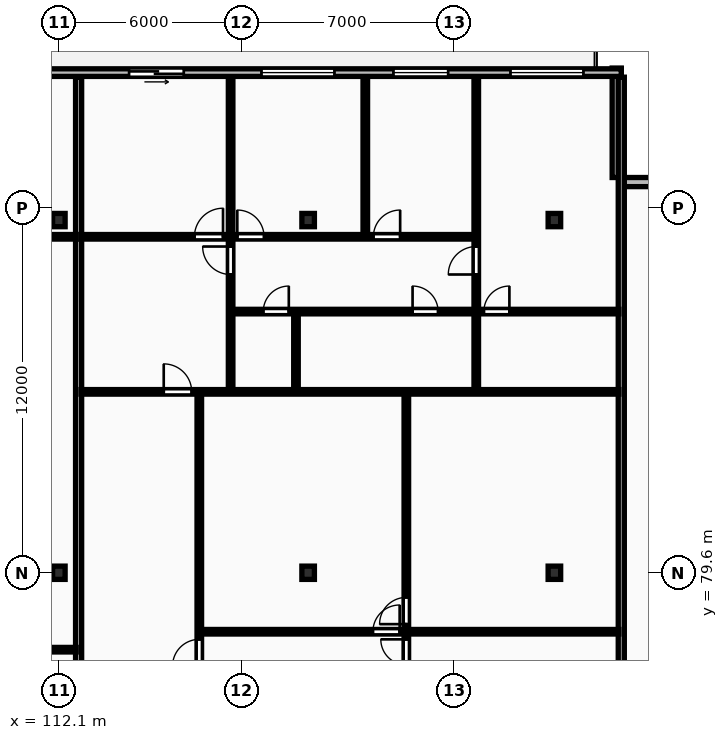
"""IFC4 building model, lengths in metres.
Left out: names, types, materials, properties, quantities, classifications, styles, units other than length and angle.
Written with IfcOpenShell. Run it as: python <this file> out.ifc"""

import sys

from ifc_helpers import new_model, si_unit, direction, frame, frame_2d, origin, origin_2d, place, context, subcontext, project, spatial, rectangle, i_section, extrude, element, fill, save


model = new_model("IFC4")
c1 = context("Model", 3, precision=1e-05, world=origin(), true_north=direction((0.0, 1.0)))
c2 = subcontext(c1, "Body", "Model", "MODEL_VIEW")
j1 = project(units=[si_unit("LENGTHUNIT", "METRE"), si_unit("PLANEANGLEUNIT", "RADIAN")], contexts=[c1])
p1 = place(None, origin())
s1 = spatial("IfcSite", under=j1, at=p1, CompositionType="ELEMENT")
p2 = place(p1, origin())
s2 = spatial("IfcBuilding", under=s1, at=p2, CompositionType="ELEMENT")
p3 = place(p2, frame((0.0, 0.0, 153.7)))
s3 = spatial("IfcBuildingStorey", under=s2, at=p3, CompositionType="ELEMENT", Elevation=153.7)
for number, where, z_axis, x_axis in (
    (1, (112.1, 79.6, 0.0), (0.0, 0.0, 1.0), (1.0, 0.0, 0.0)),
    (2, (112.1, 91.2, 0.0), (0.0, 0.0, 1.0), (1.0, 0.0, 0.0)),
    (3, (120.3, 79.6, 0.0), (0.0, 0.0, 1.0), (1.0, 0.0, 0.0)),
    (4, (120.3, 91.2, 0.0), (0.0, 0.0, 1.0), (1.0, 0.0, 0.0)),
    (5, (128.4, 79.6, 0.0), (0.0, 0.0, 1.0), (1.0, 0.0, 0.0)),
    (6, (128.4, 91.2, 0.0), (0.0, 0.0, 1.0), (1.0, 0.0, 0.0)),
):
    element("IfcColumn", number, at=place(p3, frame(where, z_axis=z_axis, x_axis=x_axis)), inside=s3, PredefinedType="COLUMN", context=c2, shape_type="SweptSolid", body=[
        extrude(i_section(OverallWidth=0.412, OverallDepth=0.437, WebThickness=0.036, FlangeThickness=0.052, FilletRadius=0.015, at=origin_2d()), origin(), (0.0, 0.0, 1.0), 3.6),
    ])
for number, where, z_axis, x_axis in (
    (7, (134.2, 92.45, 0.0), (0.0, 0.0, 1.0), (-1.0, 0.0, 0.0)),
    (8, (130.45, 92.6, 0.0), (0.0, 0.0, 1.0), (0.0, 1.0, 0.0)),
):
    element("IfcWall", number, at=place(p3, frame(where, z_axis=z_axis, x_axis=x_axis)), inside=s3, PredefinedType="STANDARD", context=c2, shape_type="SweptSolid", body=[
        extrude(rectangle(XDim=3.6, YDim=0.3, at=frame_2d((1.8, 0.0))), origin(), (0.0, 0.0, 1.0), 3.32),
    ])
p4 = place(p3, frame((130.6, 96.05, 0.0), z_axis=(0.0, 0.0, 1.0), x_axis=(-1.0, 0.0, 0.0)))
e9 = element("IfcWall", 9, at=p4, inside=s3, PredefinedType="STANDARD", context=c2, shape_type="SweptSolid", body=[
    extrude(rectangle(XDim=73.0, YDim=0.25, at=frame_2d((36.5, 0.0))), origin(), (0.0, 0.0, 1.0), 3.32),
])
p5 = place(p4, frame((68.197, 0.0, 0.0)))
e10 = element("IfcOpeningElement", 10, at=p5, cuts=e9, PredefinedType="OPENING", context=c2, shape_type="SweptSolid", body=[
    extrude(rectangle(XDim=1.8, YDim=2.2, at=frame_2d((0.9, 1.1))), frame((0.0, 0.135, 0.0), z_axis=(0.0, -1.0, 0.0), x_axis=(1.0, 0.0, 0.0)), (0.0, 0.0, 1.0), 0.27),
])
p6 = place(p4, frame((58.911, 0.0, 0.85)))
e11 = element("IfcOpeningElement", 11, at=p6, cuts=e9, PredefinedType="OPENING", context=c2, shape_type="SweptSolid", body=[
    extrude(rectangle(XDim=2.4, YDim=1.9, at=frame_2d((1.2, 0.95))), frame((0.0, 0.135, 0.0), z_axis=(0.0, -1.0, 0.0), x_axis=(1.0, 0.0, 0.0)), (0.0, 0.0, 1.0), 0.27),
])
p7 = place(p4, frame((49.571, 0.0, 0.0)))
e12 = element("IfcOpeningElement", 12, at=p7, cuts=e9, PredefinedType="OPENING", context=c2, shape_type="SweptSolid", body=[
    extrude(rectangle(XDim=1.8, YDim=2.2, at=frame_2d((0.9, 1.1))), frame((0.0, 0.135, 0.0), z_axis=(0.0, -1.0, 0.0), x_axis=(1.0, 0.0, 0.0)), (0.0, 0.0, 1.0), 0.27),
])
p8 = place(p4, frame((39.572, 0.0, 0.85)))
e13 = element("IfcOpeningElement", 13, at=p8, cuts=e9, PredefinedType="OPENING", context=c2, shape_type="SweptSolid", body=[
    extrude(rectangle(XDim=2.4, YDim=1.9, at=frame_2d((1.2, 0.95))), frame((0.0, 0.135, 0.0), z_axis=(0.0, -1.0, 0.0), x_axis=(1.0, 0.0, 0.0)), (0.0, 0.0, 1.0), 0.27),
])
p9 = place(p4, frame((30.575, 0.0, 0.0)))
e14 = element("IfcOpeningElement", 14, at=p9, cuts=e9, PredefinedType="OPENING", context=c2, shape_type="SweptSolid", body=[
    extrude(rectangle(XDim=1.8, YDim=2.2, at=frame_2d((0.9, 1.1))), frame((0.0, 0.135, 0.0), z_axis=(0.0, -1.0, 0.0), x_axis=(1.0, 0.0, 0.0)), (0.0, 0.0, 1.0), 0.27),
])
p10 = place(p4, frame((21.745, 0.0, 0.85)))
e15 = element("IfcOpeningElement", 15, at=p10, cuts=e9, PredefinedType="OPENING", context=c2, shape_type="SweptSolid", body=[
    extrude(rectangle(XDim=2.4, YDim=1.9, at=frame_2d((1.2, 0.95))), frame((0.0, 0.135, 0.0), z_axis=(0.0, -1.0, 0.0), x_axis=(1.0, 0.0, 0.0)), (0.0, 0.0, 1.0), 0.27),
])
p11 = place(p4, frame((9.435, 0.0, 0.85)))
e16 = element("IfcOpeningElement", 16, at=p11, cuts=e9, PredefinedType="OPENING", context=c2, shape_type="SweptSolid", body=[
    extrude(rectangle(XDim=2.4, YDim=1.9, at=frame_2d((1.2, 0.95))), frame((0.0, 0.135, 0.0), z_axis=(0.0, -1.0, 0.0), x_axis=(1.0, 0.0, 0.0)), (0.0, 0.0, 1.0), 0.27),
])
p12 = place(p4, frame((5.695, 0.0, 0.85)))
e17 = element("IfcOpeningElement", 17, at=p12, cuts=e9, PredefinedType="OPENING", context=c2, shape_type="SweptSolid", body=[
    extrude(rectangle(XDim=1.8, YDim=1.8, at=frame_2d((0.9, 0.9))), frame((0.0, 0.135, 0.0), z_axis=(0.0, -1.0, 0.0), x_axis=(1.0, 0.0, 0.0)), (0.0, 0.0, 1.0), 0.27),
])
p13 = place(p4, frame((14.39, 0.0, 0.0)))
e18 = element("IfcOpeningElement", 18, at=p13, cuts=e9, PredefinedType="OPENING", context=c2, shape_type="SweptSolid", body=[
    extrude(rectangle(XDim=1.8, YDim=2.2, at=frame_2d((0.9, 1.1))), frame((0.0, 0.135, 0.0), z_axis=(0.0, -1.0, 0.0), x_axis=(1.0, 0.0, 0.0)), (0.0, 0.0, 1.0), 0.27),
])
p14 = place(p4, frame((1.245, 0.0, 0.85)))
e19 = element("IfcOpeningElement", 19, at=p14, cuts=e9, PredefinedType="OPENING", context=c2, shape_type="SweptSolid", body=[
    extrude(rectangle(XDim=2.4, YDim=1.9, at=frame_2d((1.2, 0.95))), frame((0.0, 0.135, 0.0), z_axis=(0.0, -1.0, 0.0), x_axis=(1.0, 0.0, 0.0)), (0.0, 0.0, 1.0), 0.27),
])
for number, where, z_axis, x_axis in (
    (20, (130.6, 69.83, 0.0), (0.0, 0.0, 1.0), (0.0, 1.0, 0.0)),
    (21, (112.75, 69.83, 0.0), (0.0, 0.0, 1.0), (0.0, 1.0, 0.0)),
):
    element("IfcWall", number, at=place(p3, frame(where, z_axis=z_axis, x_axis=x_axis)), inside=s3, PredefinedType="PARTITIONING", context=c2, shape_type="SweptSolid", body=[
        extrude(rectangle(XDim=26.07, YDim=0.2, at=frame_2d((13.035, 0.0))), origin(), (0.0, 0.0, 1.0), 3.32),
    ])
p15 = place(p3, frame((109.31, 77.07, 0.0), z_axis=(0.0, 0.0, 1.0), x_axis=(1.0, 0.0, 0.0)))
e22 = element("IfcWall", 22, at=p15, inside=s3, PredefinedType="PARTITIONING", context=c2, shape_type="SweptSolid", body=[
    extrude(rectangle(XDim=3.36, YDim=0.15, at=frame_2d((1.68, 0.0))), origin(), (0.0, 0.0, 1.0), 3.32),
])
p16 = place(p3, frame((95.53, 90.65, 0.0), z_axis=(0.0, 0.0, 1.0), x_axis=(1.0, 0.0, 0.0)))
e23 = element("IfcWall", 23, at=p16, inside=s3, PredefinedType="PARTITIONING", context=c2, shape_type="SweptSolid", body=[
    extrude(rectangle(XDim=17.14, YDim=0.15, at=frame_2d((8.57, 0.0))), origin(), (0.0, 0.0, 1.0), 3.32),
])
p17 = place(p16, frame((4.948, 0.0, 0.0)))
e24 = element("IfcOpeningElement", 24, at=p17, cuts=e23, PredefinedType="OPENING", context=c2, shape_type="SweptSolid", body=[
    extrude(rectangle(XDim=0.92, YDim=2.08, at=frame_2d((0.46, 1.04))), frame((0.0, 0.085, 0.0), z_axis=(0.0, -1.0, 0.0), x_axis=(1.0, 0.0, 0.0)), (0.0, 0.0, 1.0), 0.17),
])
p18 = place(p16, frame((8.842, 0.0, 0.0)))
e25 = element("IfcOpeningElement", 25, at=p18, cuts=e23, PredefinedType="OPENING", context=c2, shape_type="SweptSolid", body=[
    extrude(rectangle(XDim=0.92, YDim=2.08, at=frame_2d((0.46, 1.04))), frame((0.0, 0.085, 0.0), z_axis=(0.0, -1.0, 0.0), x_axis=(1.0, 0.0, 0.0)), (0.0, 0.0, 1.0), 0.17),
])
p19 = place(p3, frame((123.53, 69.81, 0.0), z_axis=(0.0, 0.0, 1.0), x_axis=(0.0, 1.0, 0.0)))
e26 = element("IfcWall", 26, at=p19, inside=s3, PredefinedType="PARTITIONING", context=c2, shape_type="SweptSolid", body=[
    extrude(rectangle(XDim=15.7, YDim=0.15, at=frame_2d((7.85, 0.0))), origin(), (0.0, 0.0, 1.0), 3.32),
])
p20 = place(p19, frame((6.76, 0.0, 0.0)))
e27 = element("IfcOpeningElement", 27, at=p20, cuts=e26, PredefinedType="OPENING", context=c2, shape_type="SweptSolid", body=[
    extrude(rectangle(XDim=0.84, YDim=2.04, at=frame_2d((0.42, 1.02))), frame((0.0, 0.085, 0.0), z_axis=(0.0, -1.0, 0.0), x_axis=(1.0, 0.0, 0.0)), (0.0, 0.0, 1.0), 0.17),
])
p21 = place(p19, frame((8.1, 0.0, 0.0)))
e28 = element("IfcOpeningElement", 28, at=p21, cuts=e26, PredefinedType="OPENING", context=c2, shape_type="SweptSolid", body=[
    extrude(rectangle(XDim=0.88, YDim=2.06, at=frame_2d((0.44, 1.03))), frame((0.0, 0.085, 0.0), z_axis=(0.0, -1.0, 0.0), x_axis=(1.0, 0.0, 0.0)), (0.0, 0.0, 1.0), 0.17),
])
p22 = place(p3, frame((116.78, 77.66, 0.0), z_axis=(0.0, 0.0, 1.0), x_axis=(1.0, 0.0, 0.0)))
e29 = element("IfcWall", 29, at=p22, inside=s3, PredefinedType="PARTITIONING", context=c2, shape_type="SweptSolid", body=[
    extrude(rectangle(XDim=13.74, YDim=0.15, at=frame_2d((6.87, 0.0))), origin(), (0.0, 0.0, 1.0), 3.32),
])
p23 = place(p22, frame((5.65, 0.0, 0.0)))
e30 = element("IfcOpeningElement", 30, at=p23, cuts=e29, PredefinedType="OPENING", context=c2, shape_type="SweptSolid", body=[
    extrude(rectangle(XDim=0.88, YDim=2.06, at=frame_2d((0.44, 1.03))), frame((0.0, 0.085, 0.0), z_axis=(0.0, -1.0, 0.0), x_axis=(1.0, 0.0, 0.0)), (0.0, 0.0, 1.0), 0.17),
])
p24 = place(p3, frame((116.72, 69.81, 0.0), z_axis=(0.0, 0.0, 1.0), x_axis=(0.0, 1.0, 0.0)))
e31 = element("IfcWall", 31, at=p24, inside=s3, PredefinedType="PARTITIONING", context=c2, shape_type="SweptSolid", body=[
    extrude(rectangle(XDim=15.7, YDim=0.15, at=frame_2d((7.85, 0.0))), origin(), (0.0, 0.0, 1.0), 3.32),
])
p25 = place(p24, frame((6.72, 0.0, 0.0)))
e32 = element("IfcOpeningElement", 32, at=p25, cuts=e31, PredefinedType="OPENING", context=c2, shape_type="SweptSolid", body=[
    extrude(rectangle(XDim=0.88, YDim=2.06, at=frame_2d((0.44, 1.03))), frame((0.0, 0.085, 0.0), z_axis=(0.0, -1.0, 0.0), x_axis=(1.0, 0.0, 0.0)), (0.0, 0.0, 1.0), 0.17),
])
p26 = place(p3, frame((119.9, 85.59, 0.0), z_axis=(0.0, 0.0, 1.0), x_axis=(0.0, 1.0, 0.0)))
e33 = element("IfcWall", 33, at=p26, inside=s3, PredefinedType="PARTITIONING", context=c2, shape_type="SweptSolid", body=[
    extrude(rectangle(XDim=2.58, YDim=0.15, at=frame_2d((1.29, 0.0))), origin(), (0.0, 0.0, 1.0), 3.32),
])
p27 = place(p3, frame((122.18, 90.73, 0.0), z_axis=(0.0, 0.0, 1.0), x_axis=(0.0, 1.0, 0.0)))
e34 = element("IfcWall", 34, at=p27, inside=s3, PredefinedType="PARTITIONING", context=c2, shape_type="SweptSolid", body=[
    extrude(rectangle(XDim=5.17, YDim=0.15, at=frame_2d((2.585, 0.0))), origin(), (0.0, 0.0, 1.0), 3.32),
])
p28 = place(p3, frame((117.75, 85.59, 0.0), z_axis=(0.0, 0.0, 1.0), x_axis=(0.0, 1.0, 0.0)))
e35 = element("IfcWall", 35, at=p28, inside=s3, PredefinedType="PARTITIONING", context=c2, shape_type="SweptSolid", body=[
    extrude(rectangle(XDim=10.31, YDim=0.15, at=frame_2d((5.155, 0.0))), origin(), (0.0, 0.0, 1.0), 3.32),
])
p29 = place(p28, frame((3.82, 0.0, 0.0)))
e36 = element("IfcOpeningElement", 36, at=p29, cuts=e35, PredefinedType="OPENING", context=c2, shape_type="SweptSolid", body=[
    extrude(rectangle(XDim=0.92, YDim=2.08, at=frame_2d((0.46, 1.04))), frame((0.0, 0.085, 0.0), z_axis=(0.0, -1.0, 0.0), x_axis=(1.0, 0.0, 0.0)), (0.0, 0.0, 1.0), 0.17),
])
p30 = place(p3, frame((125.83, 85.59, 0.0), z_axis=(0.0, 0.0, 1.0), x_axis=(0.0, 1.0, 0.0)))
e37 = element("IfcWall", 37, at=p30, inside=s3, PredefinedType="PARTITIONING", context=c2, shape_type="SweptSolid", body=[
    extrude(rectangle(XDim=2.58, YDim=0.15, at=frame_2d((1.29, 0.0))), origin(), (0.0, 0.0, 1.0), 3.32),
])
p31 = place(p3, frame((125.83, 88.21, 0.0), z_axis=(0.0, 0.0, 1.0), x_axis=(0.0, 1.0, 0.0)))
e38 = element("IfcWall", 38, at=p31, inside=s3, PredefinedType="PARTITIONING", context=c2, shape_type="SweptSolid", body=[
    extrude(rectangle(XDim=7.69, YDim=0.15, at=frame_2d((3.845, 0.0))), origin(), (0.0, 0.0, 1.0), 3.32),
])
p32 = place(p31, frame((1.2, 0.0, 0.0)))
e39 = element("IfcOpeningElement", 39, at=p32, cuts=e38, PredefinedType="OPENING", context=c2, shape_type="SweptSolid", body=[
    extrude(rectangle(XDim=0.92, YDim=2.08, at=frame_2d((0.46, 1.04))), frame((0.0, 0.085, 0.0), z_axis=(0.0, -1.0, 0.0), x_axis=(1.0, 0.0, 0.0)), (0.0, 0.0, 1.0), 0.17),
])
p33 = place(p3, frame((117.79, 88.19, 0.0), z_axis=(0.0, 0.0, 1.0), x_axis=(1.0, 0.0, 0.0)))
e40 = element("IfcWall", 40, at=p33, inside=s3, PredefinedType="PARTITIONING", context=c2, shape_type="SweptSolid", body=[
    extrude(rectangle(XDim=12.73, YDim=0.15, at=frame_2d((6.365, 0.0))), origin(), (0.0, 0.0, 1.0), 3.32),
])
p34 = place(p33, frame((1.034, 0.0, 0.0)))
e41 = element("IfcOpeningElement", 41, at=p34, cuts=e40, PredefinedType="OPENING", context=c2, shape_type="SweptSolid", body=[
    extrude(rectangle(XDim=0.84, YDim=2.04, at=frame_2d((0.42, 1.02))), frame((0.0, 0.085, 0.0), z_axis=(0.0, -1.0, 0.0), x_axis=(1.0, 0.0, 0.0)), (0.0, 0.0, 1.0), 0.17),
])
p35 = place(p33, frame((5.945, 0.0, 0.0)))
e42 = element("IfcOpeningElement", 42, at=p35, cuts=e40, PredefinedType="OPENING", context=c2, shape_type="SweptSolid", body=[
    extrude(rectangle(XDim=0.84, YDim=2.04, at=frame_2d((0.42, 1.02))), frame((0.0, 0.085, 0.0), z_axis=(0.0, -1.0, 0.0), x_axis=(1.0, 0.0, 0.0)), (0.0, 0.0, 1.0), 0.17),
])
p36 = place(p33, frame((8.29, 0.0, 0.0)))
e43 = element("IfcOpeningElement", 43, at=p36, cuts=e40, PredefinedType="OPENING", context=c2, shape_type="SweptSolid", body=[
    extrude(rectangle(XDim=0.84, YDim=2.04, at=frame_2d((0.42, 1.02))), frame((0.0, 0.085, 0.0), z_axis=(0.0, -1.0, 0.0), x_axis=(1.0, 0.0, 0.0)), (0.0, 0.0, 1.0), 0.17),
])
p37 = place(p3, frame((112.83, 85.55, 0.0), z_axis=(0.0, 0.0, 1.0), x_axis=(1.0, 0.0, 0.0)))
e44 = element("IfcWall", 44, at=p37, inside=s3, PredefinedType="PARTITIONING", context=c2, shape_type="SweptSolid", body=[
    extrude(rectangle(XDim=17.69, YDim=0.15, at=frame_2d((8.845, 0.0))), origin(), (0.0, 0.0, 1.0), 3.32),
])
p38 = place(p37, frame((2.72, 0.0, 0.0)))
e45 = element("IfcOpeningElement", 45, at=p38, cuts=e44, PredefinedType="OPENING", context=c2, shape_type="SweptSolid", body=[
    extrude(rectangle(XDim=0.92, YDim=2.08, at=frame_2d((0.46, 1.04))), frame((0.0, 0.085, 0.0), z_axis=(0.0, -1.0, 0.0), x_axis=(1.0, 0.0, 0.0)), (0.0, 0.0, 1.0), 0.17),
])
p39 = place(p3, frame((112.83, 90.65, 0.0), z_axis=(0.0, 0.0, 1.0), x_axis=(1.0, 0.0, 0.0)))
e46 = element("IfcWall", 46, at=p39, inside=s3, PredefinedType="PARTITIONING", context=c2, shape_type="SweptSolid", body=[
    extrude(rectangle(XDim=13.0, YDim=0.15, at=frame_2d((6.5, 0.0))), origin(), (0.0, 0.0, 1.0), 3.32),
])
p40 = place(p39, frame((3.73, 0.0, 0.0)))
e47 = element("IfcOpeningElement", 47, at=p40, cuts=e46, PredefinedType="OPENING", context=c2, shape_type="SweptSolid", body=[
    extrude(rectangle(XDim=0.94, YDim=2.1, at=frame_2d((0.47, 1.05))), frame((0.0, 0.085, 0.0), z_axis=(0.0, -1.0, 0.0), x_axis=(1.0, 0.0, 0.0)), (0.0, 0.0, 1.0), 0.17),
])
p41 = place(p39, frame((5.14, 0.0, 0.0)))
e48 = element("IfcOpeningElement", 48, at=p41, cuts=e46, PredefinedType="OPENING", context=c2, shape_type="SweptSolid", body=[
    extrude(rectangle(XDim=0.88, YDim=2.06, at=frame_2d((0.44, 1.03))), frame((0.0, 0.085, 0.0), z_axis=(0.0, -1.0, 0.0), x_axis=(1.0, 0.0, 0.0)), (0.0, 0.0, 1.0), 0.17),
])
p42 = place(p39, frame((9.617, 0.0, 0.0)))
e49 = element("IfcOpeningElement", 49, at=p42, cuts=e46, PredefinedType="OPENING", context=c2, shape_type="SweptSolid", body=[
    extrude(rectangle(XDim=0.88, YDim=2.06, at=frame_2d((0.44, 1.03))), frame((0.0, 0.085, 0.0), z_axis=(0.0, -1.0, 0.0), x_axis=(1.0, 0.0, 0.0)), (0.0, 0.0, 1.0), 0.17),
])
p43 = place(p11, origin())
e50 = element("IfcWindow", 50, at=p43, inside=s3, PartitioningType="DOUBLE_PANEL_VERTICAL", PredefinedType="WINDOW", context=c2, shape_type="SweptSolid", body=[
    extrude(rectangle(XDim=2.4, YDim=1.9, at=frame_2d((1.2, 0.95))), frame((0.0, 0.03, 0.0), z_axis=(0.0, -1.0, 0.0), x_axis=(1.0, 0.0, 0.0)), (0.0, 0.0, 1.0), 0.06),
])
fill(e16, e50)
p44 = place(p12, origin())
e51 = element("IfcWindow", 51, at=p44, inside=s3, PartitioningType="SINGLE_PANEL", PredefinedType="WINDOW", context=c2, shape_type="SweptSolid", body=[
    extrude(rectangle(XDim=1.8, YDim=1.8, at=frame_2d((0.9, 0.9))), frame((0.0, 0.03, 0.0), z_axis=(0.0, -1.0, 0.0), x_axis=(1.0, 0.0, 0.0)), (0.0, 0.0, 1.0), 0.06),
])
fill(e17, e51)
p45 = place(p13, origin())
e52 = element("IfcDoor", 52, at=p45, inside=s3, OperationType="SLIDING_TO_LEFT", PredefinedType="DOOR", context=c2, shape_type="SweptSolid", body=[
    extrude(rectangle(XDim=1.8, YDim=2.2, at=frame_2d((0.9, 1.1))), frame((0.0, 0.025, 0.0), z_axis=(0.0, -1.0, 0.0), x_axis=(1.0, 0.0, 0.0)), (0.0, 0.0, 1.0), 0.05),
])
fill(e18, e52)
p46 = place(p14, origin())
e53 = element("IfcWindow", 53, at=p46, inside=s3, PartitioningType="DOUBLE_PANEL_VERTICAL", PredefinedType="WINDOW", context=c2, shape_type="SweptSolid", body=[
    extrude(rectangle(XDim=2.4, YDim=1.9, at=frame_2d((1.2, 0.95))), frame((0.0, 0.03, 0.0), z_axis=(0.0, -1.0, 0.0), x_axis=(1.0, 0.0, 0.0)), (0.0, 0.0, 1.0), 0.06),
])
fill(e19, e53)
p47 = place(p20, origin())
e54 = element("IfcDoor", 54, at=p47, inside=s3, OperationType="SINGLE_SWING_RIGHT", PredefinedType="DOOR", context=c2, shape_type="SweptSolid", body=[
    extrude(rectangle(XDim=0.84, YDim=2.04, at=frame_2d((0.42, 1.02))), frame((0.0, 0.025, 0.0), z_axis=(0.0, -1.0, 0.0), x_axis=(1.0, 0.0, 0.0)), (0.0, 0.0, 1.0), 0.05),
])
fill(e27, e54)
p48 = place(p21, origin())
e55 = element("IfcDoor", 55, at=p48, inside=s3, OperationType="SINGLE_SWING_LEFT", PredefinedType="DOOR", context=c2, shape_type="SweptSolid", body=[
    extrude(rectangle(XDim=0.88, YDim=2.06, at=frame_2d((0.44, 1.03))), frame((0.0, 0.025, 0.0), z_axis=(0.0, -1.0, 0.0), x_axis=(1.0, 0.0, 0.0)), (0.0, 0.0, 1.0), 0.05),
])
fill(e28, e55)
p49 = place(p23, origin())
e56 = element("IfcDoor", 56, at=p49, inside=s3, OperationType="SINGLE_SWING_RIGHT", PredefinedType="DOOR", context=c2, shape_type="SweptSolid", body=[
    extrude(rectangle(XDim=0.88, YDim=2.06, at=frame_2d((0.44, 1.03))), frame((0.0, 0.025, 0.0), z_axis=(0.0, -1.0, 0.0), x_axis=(1.0, 0.0, 0.0)), (0.0, 0.0, 1.0), 0.05),
])
fill(e30, e56)
p50 = place(p25, origin())
e57 = element("IfcDoor", 57, at=p50, inside=s3, OperationType="SINGLE_SWING_LEFT", PredefinedType="DOOR", context=c2, shape_type="SweptSolid", body=[
    extrude(rectangle(XDim=0.88, YDim=2.06, at=frame_2d((0.44, 1.03))), frame((0.0, 0.025, 0.0), z_axis=(0.0, -1.0, 0.0), x_axis=(1.0, 0.0, 0.0)), (0.0, 0.0, 1.0), 0.05),
])
fill(e32, e57)
p51 = place(p29, origin())
e58 = element("IfcDoor", 58, at=p51, inside=s3, OperationType="SINGLE_SWING_RIGHT", PredefinedType="DOOR", context=c2, shape_type="SweptSolid", body=[
    extrude(rectangle(XDim=0.92, YDim=2.08, at=frame_2d((0.46, 1.04))), frame((0.0, 0.025, 0.0), z_axis=(0.0, -1.0, 0.0), x_axis=(1.0, 0.0, 0.0)), (0.0, 0.0, 1.0), 0.05),
])
fill(e36, e58)
p52 = place(p32, origin())
e59 = element("IfcDoor", 59, at=p52, inside=s3, OperationType="SINGLE_SWING_LEFT", PredefinedType="DOOR", context=c2, shape_type="SweptSolid", body=[
    extrude(rectangle(XDim=0.92, YDim=2.08, at=frame_2d((0.46, 1.04))), frame((0.0, 0.025, 0.0), z_axis=(0.0, -1.0, 0.0), x_axis=(1.0, 0.0, 0.0)), (0.0, 0.0, 1.0), 0.05),
])
fill(e39, e59)
p53 = place(p34, origin())
e60 = element("IfcDoor", 60, at=p53, inside=s3, OperationType="SINGLE_SWING_RIGHT", PredefinedType="DOOR", context=c2, shape_type="SweptSolid", body=[
    extrude(rectangle(XDim=0.84, YDim=2.04, at=frame_2d((0.42, 1.02))), frame((0.0, 0.025, 0.0), z_axis=(0.0, -1.0, 0.0), x_axis=(1.0, 0.0, 0.0)), (0.0, 0.0, 1.0), 0.05),
])
fill(e41, e60)
p54 = place(p35, origin())
e61 = element("IfcDoor", 61, at=p54, inside=s3, OperationType="SINGLE_SWING_LEFT", PredefinedType="DOOR", context=c2, shape_type="SweptSolid", body=[
    extrude(rectangle(XDim=0.84, YDim=2.04, at=frame_2d((0.42, 1.02))), frame((0.0, 0.025, 0.0), z_axis=(0.0, -1.0, 0.0), x_axis=(1.0, 0.0, 0.0)), (0.0, 0.0, 1.0), 0.05),
])
fill(e42, e61)
p55 = place(p36, origin())
e62 = element("IfcDoor", 62, at=p55, inside=s3, OperationType="SINGLE_SWING_RIGHT", PredefinedType="DOOR", context=c2, shape_type="SweptSolid", body=[
    extrude(rectangle(XDim=0.84, YDim=2.04, at=frame_2d((0.42, 1.02))), frame((0.0, 0.025, 0.0), z_axis=(0.0, -1.0, 0.0), x_axis=(1.0, 0.0, 0.0)), (0.0, 0.0, 1.0), 0.05),
])
fill(e43, e62)
p56 = place(p38, origin())
e63 = element("IfcDoor", 63, at=p56, inside=s3, OperationType="SINGLE_SWING_LEFT", PredefinedType="DOOR", context=c2, shape_type="SweptSolid", body=[
    extrude(rectangle(XDim=0.92, YDim=2.08, at=frame_2d((0.46, 1.04))), frame((0.0, 0.025, 0.0), z_axis=(0.0, -1.0, 0.0), x_axis=(1.0, 0.0, 0.0)), (0.0, 0.0, 1.0), 0.05),
])
fill(e45, e63)
p57 = place(p40, origin())
e64 = element("IfcDoor", 64, at=p57, inside=s3, OperationType="SINGLE_SWING_RIGHT", PredefinedType="DOOR", context=c2, shape_type="SweptSolid", body=[
    extrude(rectangle(XDim=0.94, YDim=2.1, at=frame_2d((0.47, 1.05))), frame((0.0, 0.025, 0.0), z_axis=(0.0, -1.0, 0.0), x_axis=(1.0, 0.0, 0.0)), (0.0, 0.0, 1.0), 0.05),
])
fill(e47, e64)
p58 = place(p41, origin())
e65 = element("IfcDoor", 65, at=p58, inside=s3, OperationType="SINGLE_SWING_LEFT", PredefinedType="DOOR", context=c2, shape_type="SweptSolid", body=[
    extrude(rectangle(XDim=0.88, YDim=2.06, at=frame_2d((0.44, 1.03))), frame((0.0, 0.025, 0.0), z_axis=(0.0, -1.0, 0.0), x_axis=(1.0, 0.0, 0.0)), (0.0, 0.0, 1.0), 0.05),
])
fill(e48, e65)
p59 = place(p42, origin())
e66 = element("IfcDoor", 66, at=p59, inside=s3, OperationType="SINGLE_SWING_RIGHT", PredefinedType="DOOR", context=c2, shape_type="SweptSolid", body=[
    extrude(rectangle(XDim=0.88, YDim=2.06, at=frame_2d((0.44, 1.03))), frame((0.0, 0.025, 0.0), z_axis=(0.0, -1.0, 0.0), x_axis=(1.0, 0.0, 0.0)), (0.0, 0.0, 1.0), 0.05),
])
fill(e49, e66)
save(model, sys.argv[1])
